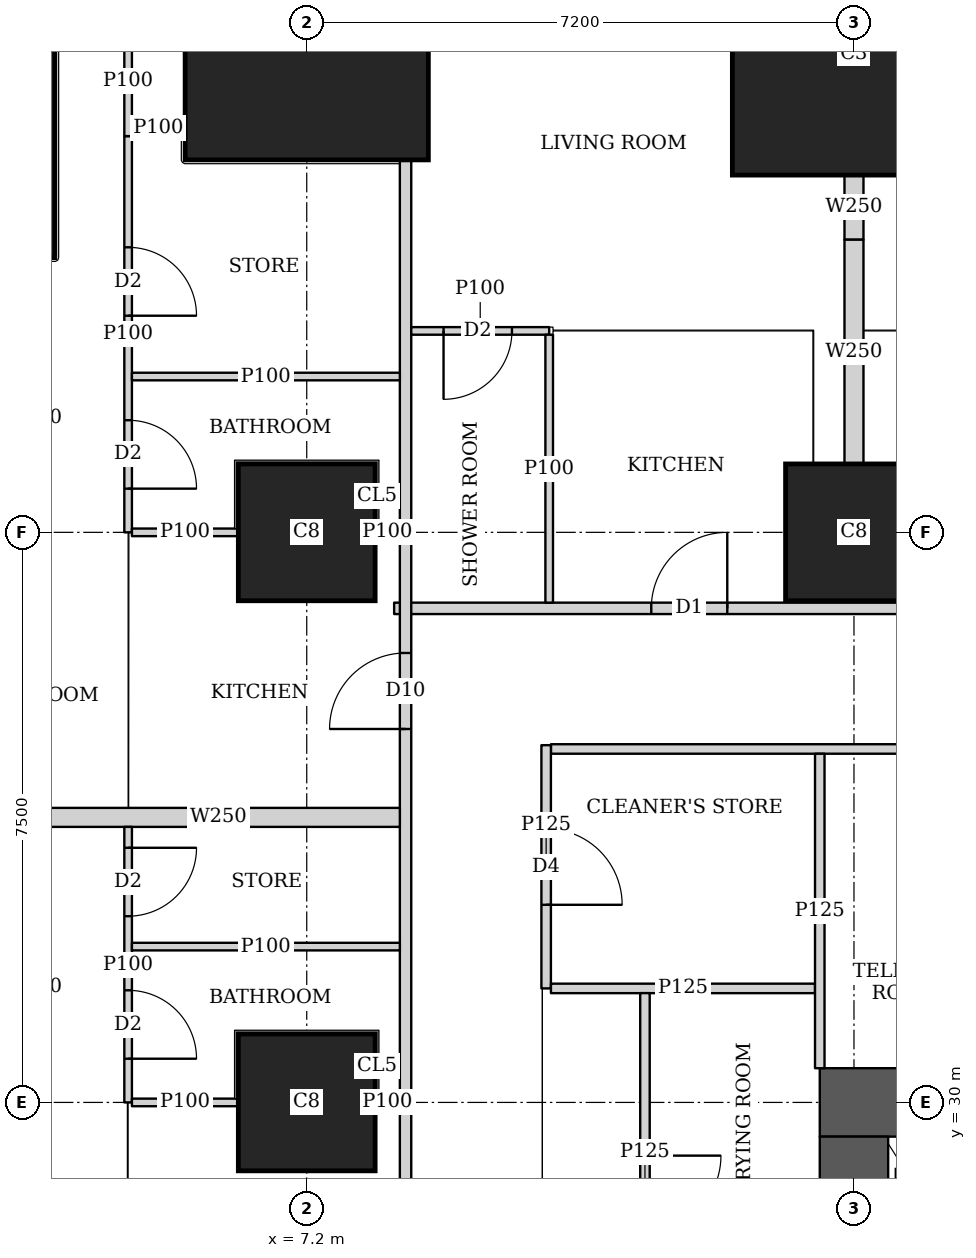
"""IFC4 building model, lengths in metres.
Left out: names, types, materials, properties, quantities, classifications, styles, units other than length and angle.
Written with IfcOpenShell. Run it as: python <this file> out.ifc"""

import sys

from ifc_helpers import new_model, si_unit, direction, frame, frame_2d, origin, origin_2d, place, context, subcontext, project, spatial, rectangle, extrude, element, fill, save


model = new_model("IFC4")
c1 = context("Model", 3, precision=1e-05, world=origin(), true_north=direction((0.0, 1.0)))
c2 = subcontext(c1, "Body", "Model", "MODEL_VIEW")
j1 = project(units=[si_unit("LENGTHUNIT", "METRE"), si_unit("PLANEANGLEUNIT", "RADIAN")], contexts=[c1])
p1 = place(None, origin())
s1 = spatial("IfcSite", under=j1, at=p1, CompositionType="ELEMENT")
p2 = place(p1, origin())
s2 = spatial("IfcBuilding", under=s1, at=p2, CompositionType="ELEMENT")
p3 = place(p2, frame((0.0, 0.0, 20.0)))
s3 = spatial("IfcBuildingStorey", under=s2, at=p3, CompositionType="ELEMENT", Elevation=20.0)
for number, where, z_axis, x_axis in (
    (1, (7.2, 30.0, 0.0), (0.0, 0.0, 1.0), (1.0, 0.0, 0.0)),
    (2, (7.2, 37.5, 0.0), (0.0, 0.0, 1.0), (1.0, 0.0, 0.0)),
    (3, (14.4, 37.5, 0.0), (0.0, 0.0, 1.0), (1.0, 0.0, 0.0)),
):
    element("IfcColumn", number, at=place(p3, frame(where, z_axis=z_axis, x_axis=x_axis)), inside=s3, PredefinedType="COLUMN", context=c2, shape_type="SweptSolid", body=[
        extrude(rectangle(XDim=1.8, YDim=1.8, at=origin_2d()), origin(), (0.0, 0.0, 1.0), 3.75),
    ])
p4 = place(p3, frame((2.186, 42.814, 0.0), z_axis=(0.0, 0.0, 1.0), x_axis=(1.0, 0.0, 0.0)))
e4 = element("IfcColumn", 4, at=p4, inside=s3, PredefinedType="COLUMN", context=c2, shape_type="SweptSolid", body=[
    extrude(rectangle(XDim=3.4, YDim=3.4, at=origin_2d()), origin(), (0.0, 0.0, 1.0), 3.75),
])
p5 = place(p3, frame((7.2, 44.0, -0.3), z_axis=(0.0, 0.0, 1.0), x_axis=(1.0, 0.0, 0.0)))
e5 = element("IfcColumn", 5, at=p5, inside=s3, PredefinedType="COLUMN", context=c2, shape_type="SweptSolid", body=[
    extrude(rectangle(XDim=3.2, YDim=3.2, at=origin_2d()), origin(), (0.0, 0.0, 1.0), 4.05),
])
p6 = place(p3, frame((14.4, 43.8, 0.0), z_axis=(0.0, 0.0, 1.0), x_axis=(1.0, 0.0, 0.0)))
e6 = element("IfcColumn", 6, at=p6, inside=s3, PredefinedType="COLUMN", context=c2, shape_type="SweptSolid", body=[
    extrude(rectangle(XDim=3.2, YDim=3.2, at=origin_2d()), origin(), (0.0, 0.0, 1.0), 3.75),
])
p7 = place(p3, frame((13.95, 30.0, 0.0), z_axis=(0.0, 0.0, 1.0), x_axis=(1.0, 0.0, 0.0)))
e7 = element("IfcWall", 7, at=p7, inside=s3, PredefinedType="SHEAR", context=c2, shape_type="SweptSolid", body=[
    extrude(rectangle(XDim=15.3, YDim=0.9, at=frame_2d((7.65, 0.0))), origin(), (0.0, 0.0, 1.0), 3.75),
])
p8 = place(p7, frame((4.45, 0.0, 0.0)))
e8 = element("IfcOpeningElement", 8, at=p8, cuts=e7, PredefinedType="OPENING", context=c2, shape_type="SweptSolid", body=[
    extrude(rectangle(XDim=1.8, YDim=2.1, at=frame_2d((0.9, 1.05))), frame((0.0, 0.46, 0.0), z_axis=(0.0, -1.0, 0.0), x_axis=(1.0, 0.0, 0.0)), (0.0, 0.0, 1.0), 0.92),
])
p9 = place(p7, frame((10.7, 0.0, 0.0)))
e9 = element("IfcOpeningElement", 9, at=p9, cuts=e7, PredefinedType="OPENING", context=c2, shape_type="SweptSolid", body=[
    extrude(rectangle(XDim=1.1, YDim=2.1, at=frame_2d((0.55, 1.05))), frame((0.0, 0.46, 0.0), z_axis=(0.0, -1.0, 0.0), x_axis=(1.0, 0.0, 0.0)), (0.0, 0.0, 1.0), 0.92),
])
p10 = place(p3, frame((14.4, 15.45, 0.0), z_axis=(0.0, 0.0, 1.0), x_axis=(0.0, 1.0, 0.0)))
e10 = element("IfcWall", 10, at=p10, inside=s3, PredefinedType="SHEAR", context=c2, shape_type="SweptSolid", body=[
    extrude(rectangle(XDim=14.1, YDim=0.9, at=frame_2d((7.05, 0.0))), origin(), (0.0, 0.0, 1.0), 3.75),
])
p11 = place(p3, frame((8.5, 2.626, 0.0), z_axis=(0.0, 0.0, 1.0), x_axis=(0.0, 1.0, 0.0)))
e11 = element("IfcWall", 11, at=p11, inside=s3, PredefinedType="SOLIDWALL", context=c2, shape_type="SweptSolid", body=[
    extrude(rectangle(XDim=39.773, YDim=0.15, at=frame_2d((19.886, 0.0))), origin(), (0.0, 0.0, 1.0), 2.05),
])
p12 = place(p11, frame((9.786, 0.0, 0.0)))
e12 = element("IfcOpeningElement", 12, at=p12, cuts=e11, PredefinedType="OPENING", context=c2, shape_type="SweptSolid", body=[
    extrude(rectangle(XDim=1.0, YDim=2.0, at=frame_2d((0.5, 1.0))), frame((0.0, 0.085, 0.0), z_axis=(0.0, -1.0, 0.0), x_axis=(1.0, 0.0, 0.0)), (0.0, 0.0, 1.0), 0.17),
])
p13 = place(p11, frame((13.961, 0.0, 0.0)))
e13 = element("IfcOpeningElement", 13, at=p13, cuts=e11, PredefinedType="OPENING", context=c2, shape_type="SweptSolid", body=[
    extrude(rectangle(XDim=1.0, YDim=2.0, at=frame_2d((0.5, 1.0))), frame((0.0, 0.085, 0.0), z_axis=(0.0, -1.0, 0.0), x_axis=(1.0, 0.0, 0.0)), (0.0, 0.0, 1.0), 0.17),
])
p14 = place(p11, frame((24.787, 0.0, 0.0)))
e14 = element("IfcOpeningElement", 14, at=p14, cuts=e11, PredefinedType="OPENING", context=c2, shape_type="SweptSolid", body=[
    extrude(rectangle(XDim=1.0, YDim=2.0, at=frame_2d((0.5, 1.0))), frame((0.0, 0.085, 0.0), z_axis=(0.0, -1.0, 0.0), x_axis=(1.0, 0.0, 0.0)), (0.0, 0.0, 1.0), 0.17),
])
p15 = place(p11, frame((32.287, 0.0, 0.0)))
e15 = element("IfcOpeningElement", 15, at=p15, cuts=e11, PredefinedType="OPENING", context=c2, shape_type="SweptSolid", body=[
    extrude(rectangle(XDim=1.0, YDim=2.0, at=frame_2d((0.5, 1.0))), frame((0.0, 0.085, 0.0), z_axis=(0.0, -1.0, 0.0), x_axis=(1.0, 0.0, 0.0)), (0.0, 0.0, 1.0), 0.17),
])
p16 = place(p3, frame((8.35, 36.5, 0.0), z_axis=(0.0, 0.0, 1.0), x_axis=(1.0, 0.0, 0.0)))
e16 = element("IfcWall", 16, at=p16, inside=s3, PredefinedType="SOLIDWALL", context=c2, shape_type="SweptSolid", body=[
    extrude(rectangle(XDim=26.415, YDim=0.15, at=frame_2d((13.208, 0.0))), origin(), (0.0, 0.0, 1.0), 3.5),
])
p17 = place(p16, frame((3.383, 0.0, 0.0)))
e17 = element("IfcOpeningElement", 17, at=p17, cuts=e16, PredefinedType="OPENING", context=c2, shape_type="SweptSolid", body=[
    extrude(rectangle(XDim=1.0, YDim=2.1, at=frame_2d((0.5, 1.05))), frame((0.0, 0.085, 0.0), z_axis=(0.0, -1.0, 0.0), x_axis=(1.0, 0.0, 0.0)), (0.0, 0.0, 1.0), 0.17),
])
p18 = place(p16, frame((7.65, 0.0, 0.0)))
e18 = element("IfcOpeningElement", 18, at=p18, cuts=e16, PredefinedType="OPENING", context=c2, shape_type="SweptSolid", body=[
    extrude(rectangle(XDim=1.0, YDim=2.1, at=frame_2d((0.5, 1.05))), frame((0.0, 0.085, 0.0), z_axis=(0.0, -1.0, 0.0), x_axis=(1.0, 0.0, 0.0)), (0.0, 0.0, 1.0), 0.17),
])
p19 = place(p16, frame((14.857, 0.0, 0.0)))
e19 = element("IfcOpeningElement", 19, at=p19, cuts=e16, PredefinedType="OPENING", context=c2, shape_type="SweptSolid", body=[
    extrude(rectangle(XDim=1.0, YDim=2.1, at=frame_2d((0.5, 1.05))), frame((0.0, 0.085, 0.0), z_axis=(0.0, -1.0, 0.0), x_axis=(1.0, 0.0, 0.0)), (0.0, 0.0, 1.0), 0.17),
])
p20 = place(p3, frame((4.85, 30.0, 0.0), z_axis=(0.0, 0.0, 1.0), x_axis=(0.0, 1.0, 0.0)))
e20 = element("IfcWall", 20, at=p20, inside=s3, PredefinedType="PARTITIONING", context=c2, shape_type="SweptSolid", body=[
    extrude(rectangle(XDim=3.625, YDim=0.1, at=frame_2d((1.812, 0.0))), origin(), (0.0, 0.0, 1.0), 3.5),
])
p21 = place(p20, frame((0.575, 0.0, 0.0)))
e21 = element("IfcOpeningElement", 21, at=p21, cuts=e20, PredefinedType="OPENING", context=c2, shape_type="SweptSolid", body=[
    extrude(rectangle(XDim=0.9, YDim=2.1, at=frame_2d((0.45, 1.05))), frame((0.0, 0.06, 0.0), z_axis=(0.0, -1.0, 0.0), x_axis=(1.0, 0.0, 0.0)), (0.0, 0.0, 1.0), 0.12),
])
p22 = place(p20, frame((2.45, 0.0, 0.0)))
e22 = element("IfcOpeningElement", 22, at=p22, cuts=e20, PredefinedType="OPENING", context=c2, shape_type="SweptSolid", body=[
    extrude(rectangle(XDim=0.9, YDim=2.1, at=frame_2d((0.45, 1.05))), frame((0.0, 0.06, 0.0), z_axis=(0.0, -1.0, 0.0), x_axis=(1.0, 0.0, 0.0)), (0.0, 0.0, 1.0), 0.12),
])
p23 = place(p3, frame((4.9, 30.0, 0.0), z_axis=(0.0, 0.0, 1.0), x_axis=(1.0, 0.0, 0.0)))
e23 = element("IfcWall", 23, at=p23, inside=s3, PredefinedType="PARTITIONING", context=c2, shape_type="SweptSolid", body=[
    extrude(rectangle(XDim=1.399, YDim=0.1, at=frame_2d((0.7, 0.0))), origin(), (0.0, 0.0, 1.0), 3.5),
])
p24 = place(p3, frame((8.101, 30.0, 0.0), z_axis=(0.0, 0.0, 1.0), x_axis=(1.0, 0.0, 0.0)))
e24 = element("IfcWall", 24, at=p24, inside=s3, PredefinedType="PARTITIONING", context=c2, shape_type="SweptSolid", body=[
    extrude(rectangle(XDim=0.324, YDim=0.1, at=frame_2d((0.162, 0.0))), origin(), (0.0, 0.0, 1.0), 3.5),
])
p25 = place(p3, frame((4.9, 32.05, 0.0), z_axis=(0.0, 0.0, 1.0), x_axis=(1.0, 0.0, 0.0)))
e25 = element("IfcWall", 25, at=p25, inside=s3, PredefinedType="PARTITIONING", context=c2, shape_type="SweptSolid", body=[
    extrude(rectangle(XDim=3.525, YDim=0.1, at=frame_2d((1.763, 0.0))), origin(), (0.0, 0.0, 1.0), 3.5),
])
p26 = place(p3, frame((4.85, 37.5, 0.0), z_axis=(0.0, 0.0, 1.0), x_axis=(0.0, 1.0, 0.0)))
e26 = element("IfcWall", 26, at=p26, inside=s3, PredefinedType="PARTITIONING", context=c2, shape_type="SweptSolid", body=[
    extrude(rectangle(XDim=5.213, YDim=0.1, at=frame_2d((2.606, 0.0))), origin(), (0.0, 0.0, 1.0), 3.5),
])
p27 = place(p26, frame((0.575, 0.0, 0.0)))
e27 = element("IfcOpeningElement", 27, at=p27, cuts=e26, PredefinedType="OPENING", context=c2, shape_type="SweptSolid", body=[
    extrude(rectangle(XDim=0.9, YDim=2.1, at=frame_2d((0.45, 1.05))), frame((0.0, 0.06, 0.0), z_axis=(0.0, -1.0, 0.0), x_axis=(1.0, 0.0, 0.0)), (0.0, 0.0, 1.0), 0.12),
])
p28 = place(p26, frame((2.85, 0.0, 0.0)))
e28 = element("IfcOpeningElement", 28, at=p28, cuts=e26, PredefinedType="OPENING", context=c2, shape_type="SweptSolid", body=[
    extrude(rectangle(XDim=0.9, YDim=2.1, at=frame_2d((0.45, 1.05))), frame((0.0, 0.06, 0.0), z_axis=(0.0, -1.0, 0.0), x_axis=(1.0, 0.0, 0.0)), (0.0, 0.0, 1.0), 0.12),
])
p29 = place(p3, frame((4.85, 42.713, 0.0), z_axis=(0.0, 0.0, 1.0), x_axis=(0.0, 1.0, 0.0)))
e29 = element("IfcWall", 29, at=p29, inside=s3, PredefinedType="PARTITIONING", context=c2, shape_type="SweptSolid", body=[
    extrude(rectangle(XDim=1.462, YDim=0.1, at=frame_2d((0.731, 0.0))), origin(), (0.0, 0.0, 1.0), 2.1),
])
p30 = place(p3, frame((4.9, 37.5, 0.0), z_axis=(0.0, 0.0, 1.0), x_axis=(1.0, 0.0, 0.0)))
e30 = element("IfcWall", 30, at=p30, inside=s3, PredefinedType="PARTITIONING", context=c2, shape_type="SweptSolid", body=[
    extrude(rectangle(XDim=1.399, YDim=0.1, at=frame_2d((0.7, 0.0))), origin(), (0.0, 0.0, 1.0), 3.5),
])
p31 = place(p3, frame((8.101, 37.5, 0.0), z_axis=(0.0, 0.0, 1.0), x_axis=(1.0, 0.0, 0.0)))
e31 = element("IfcWall", 31, at=p31, inside=s3, PredefinedType="PARTITIONING", context=c2, shape_type="SweptSolid", body=[
    extrude(rectangle(XDim=0.324, YDim=0.1, at=frame_2d((0.162, 0.0))), origin(), (0.0, 0.0, 1.0), 3.5),
])
p32 = place(p3, frame((4.9, 42.814, 0.0), z_axis=(0.0, 0.0, 1.0), x_axis=(1.0, 0.0, 0.0)))
e32 = element("IfcWall", 32, at=p32, inside=s3, PredefinedType="PARTITIONING", context=c2, shape_type="SweptSolid", body=[
    extrude(rectangle(XDim=0.699, YDim=0.1, at=frame_2d((0.35, 0.0))), origin(), (0.0, 0.0, 1.0), 2.1),
])
p33 = place(p3, frame((4.9, 39.55, 0.0), z_axis=(0.0, 0.0, 1.0), x_axis=(1.0, 0.0, 0.0)))
e33 = element("IfcWall", 33, at=p33, inside=s3, PredefinedType="PARTITIONING", context=c2, shape_type="SweptSolid", body=[
    extrude(rectangle(XDim=3.525, YDim=0.1, at=frame_2d((1.763, 0.0))), origin(), (0.0, 0.0, 1.0), 3.5),
])
p34 = place(p3, frame((3.65, 33.75, 0.0), z_axis=(0.0, 0.0, 1.0), x_axis=(1.0, 0.0, 0.0)))
e34 = element("IfcWall", 34, at=p34, inside=s3, PredefinedType="SOLIDWALL", context=c2, shape_type="SweptSolid", body=[
    extrude(rectangle(XDim=4.775, YDim=0.25, at=frame_2d((2.388, 0.0))), origin(), (0.0, 0.0, 1.0), 3.5),
])
p35 = place(p3, frame((8.575, 40.15, 0.0), z_axis=(0.0, 0.0, 1.0), x_axis=(1.0, 0.0, 0.0)))
e35 = element("IfcWall", 35, at=p35, inside=s3, PredefinedType="PARTITIONING", context=c2, shape_type="SweptSolid", body=[
    extrude(rectangle(XDim=1.815, YDim=0.1, at=frame_2d((0.907, 0.0))), origin(), (0.0, 0.0, 1.0), 3.5),
])
p36 = place(p35, frame((0.425, 0.0, 0.0)))
e36 = element("IfcOpeningElement", 36, at=p36, cuts=e35, PredefinedType="OPENING", context=c2, shape_type="SweptSolid", body=[
    extrude(rectangle(XDim=0.9, YDim=2.1, at=frame_2d((0.45, 1.05))), frame((0.0, 0.06, 0.0), z_axis=(0.0, -1.0, 0.0), x_axis=(1.0, 0.0, 0.0)), (0.0, 0.0, 1.0), 0.12),
])
p37 = place(p3, frame((10.39, 36.575, 0.0), z_axis=(0.0, 0.0, 1.0), x_axis=(0.0, 1.0, 0.0)))
e37 = element("IfcWall", 37, at=p37, inside=s3, PredefinedType="PARTITIONING", context=c2, shape_type="SweptSolid", body=[
    extrude(rectangle(XDim=3.525, YDim=0.1, at=frame_2d((1.763, 0.0))), origin(), (0.0, 0.0, 1.0), 3.5),
])
p38 = place(p3, frame((14.4, 41.35, 0.0), z_axis=(0.0, 0.0, 1.0), x_axis=(0.0, 1.0, 0.0)))
e38 = element("IfcWall", 38, at=p38, inside=s3, PredefinedType="SOLIDWALL", context=c2, shape_type="SweptSolid", body=[
    extrude(rectangle(XDim=0.849, YDim=0.25, at=frame_2d((0.424, 0.0))), origin(), (0.0, 0.0, 1.0), 2.05),
])
p39 = place(p3, frame((14.4, 38.401, 0.0), z_axis=(0.0, 0.0, 1.0), x_axis=(0.0, 1.0, 0.0)))
e39 = element("IfcWall", 39, at=p39, inside=s3, PredefinedType="SOLIDWALL", context=c2, shape_type="SweptSolid", body=[
    extrude(rectangle(XDim=2.949, YDim=0.25, at=frame_2d((1.475, 0.0))), origin(), (0.0, 0.0, 1.0), 3.5),
])
p40 = place(p3, frame((10.35, 31.5, 0.0), z_axis=(0.0, 0.0, 1.0), x_axis=(0.0, 1.0, 0.0)))
e40 = element("IfcWall", 40, at=p40, inside=s3, PredefinedType="PARTITIONING", context=c2, shape_type="SweptSolid", body=[
    extrude(rectangle(XDim=3.2, YDim=0.125, at=frame_2d((1.6, 0.0))), origin(), (0.0, 0.0, 1.0), 3.5),
])
p41 = place(p40, frame((1.1, 0.0, 0.0)))
e41 = element("IfcOpeningElement", 41, at=p41, cuts=e40, PredefinedType="OPENING", context=c2, shape_type="SweptSolid", body=[
    extrude(rectangle(XDim=1.0, YDim=2.1, at=frame_2d((0.5, 1.05))), frame((0.0, 0.073, 0.0), z_axis=(0.0, -1.0, 0.0), x_axis=(1.0, 0.0, 0.0)), (0.0, 0.0, 1.0), 0.145),
])
p42 = place(p3, frame((11.65, 26.163, 0.0), z_axis=(0.0, 0.0, 1.0), x_axis=(0.0, 1.0, 0.0)))
e42 = element("IfcWall", 42, at=p42, inside=s3, PredefinedType="PARTITIONING", context=c2, shape_type="SweptSolid", body=[
    extrude(rectangle(XDim=5.275, YDim=0.125, at=frame_2d((2.637, 0.0))), origin(), (0.0, 0.0, 1.0), 3.5),
])
p43 = place(p42, frame((2.137, 0.0, 0.0)))
e43 = element("IfcOpeningElement", 43, at=p43, cuts=e42, PredefinedType="OPENING", context=c2, shape_type="SweptSolid", body=[
    extrude(rectangle(XDim=1.0, YDim=2.1, at=frame_2d((0.5, 1.05))), frame((0.0, 0.073, 0.0), z_axis=(0.0, -1.0, 0.0), x_axis=(1.0, 0.0, 0.0)), (0.0, 0.0, 1.0), 0.145),
])
p44 = place(p3, frame((10.413, 31.5, 0.0), z_axis=(0.0, 0.0, 1.0), x_axis=(1.0, 0.0, 0.0)))
e44 = element("IfcWall", 44, at=p44, inside=s3, PredefinedType="PARTITIONING", context=c2, shape_type="SweptSolid", body=[
    extrude(rectangle(XDim=3.475, YDim=0.125, at=frame_2d((1.737, 0.0))), origin(), (0.0, 0.0, 1.0), 3.5),
])
p45 = place(p3, frame((13.95, 30.45, 0.0), z_axis=(0.0, 0.0, 1.0), x_axis=(0.0, 1.0, 0.0)))
e45 = element("IfcWall", 45, at=p45, inside=s3, PredefinedType="PARTITIONING", context=c2, shape_type="SweptSolid", body=[
    extrude(rectangle(XDim=4.137, YDim=0.125, at=frame_2d((2.068, 0.0))), origin(), (0.0, 0.0, 1.0), 3.5),
])
p46 = place(p3, frame((10.413, 34.65, 0.0), z_axis=(0.0, 0.0, 1.0), x_axis=(1.0, 0.0, 0.0)))
e46 = element("IfcWall", 46, at=p46, inside=s3, PredefinedType="PARTITIONING", context=c2, shape_type="SweptSolid", body=[
    extrude(rectangle(XDim=10.837, YDim=0.125, at=frame_2d((5.418, 0.0))), origin(), (0.0, 0.0, 1.0), 3.5),
])
p47 = place(p46, frame((7.487, 0.0, 0.0)))
e47 = element("IfcOpeningElement", 47, at=p47, cuts=e46, PredefinedType="OPENING", context=c2, shape_type="SweptSolid", body=[
    extrude(rectangle(XDim=1.8, YDim=2.1, at=frame_2d((0.9, 1.05))), frame((0.0, 0.073, 0.0), z_axis=(0.0, -1.0, 0.0), x_axis=(1.0, 0.0, 0.0)), (0.0, 0.0, 1.0), 0.145),
])
p48 = place(p21, origin())
e48 = element("IfcDoor", 48, at=p48, inside=s3, OperationType="SINGLE_SWING_RIGHT", PredefinedType="DOOR", context=c2, shape_type="SweptSolid", body=[
    extrude(rectangle(XDim=0.9, YDim=2.1, at=frame_2d((0.45, 1.05))), frame((0.0, 0.025, 0.0), z_axis=(0.0, -1.0, 0.0), x_axis=(1.0, 0.0, 0.0)), (0.0, 0.0, 1.0), 0.05),
])
fill(e21, e48)
p49 = place(p22, origin())
e49 = element("IfcDoor", 49, at=p49, inside=s3, OperationType="SINGLE_SWING_LEFT", PredefinedType="DOOR", context=c2, shape_type="SweptSolid", body=[
    extrude(rectangle(XDim=0.9, YDim=2.1, at=frame_2d((0.45, 1.05))), frame((0.0, 0.025, 0.0), z_axis=(0.0, -1.0, 0.0), x_axis=(1.0, 0.0, 0.0)), (0.0, 0.0, 1.0), 0.05),
])
fill(e22, e49)
p50 = place(p27, origin())
e50 = element("IfcDoor", 50, at=p50, inside=s3, OperationType="SINGLE_SWING_RIGHT", PredefinedType="DOOR", context=c2, shape_type="SweptSolid", body=[
    extrude(rectangle(XDim=0.9, YDim=2.1, at=frame_2d((0.45, 1.05))), frame((0.0, 0.025, 0.0), z_axis=(0.0, -1.0, 0.0), x_axis=(1.0, 0.0, 0.0)), (0.0, 0.0, 1.0), 0.05),
])
fill(e27, e50)
p51 = place(p28, origin())
e51 = element("IfcDoor", 51, at=p51, inside=s3, OperationType="SINGLE_SWING_RIGHT", PredefinedType="DOOR", context=c2, shape_type="SweptSolid", body=[
    extrude(rectangle(XDim=0.9, YDim=2.1, at=frame_2d((0.45, 1.05))), frame((0.0, 0.025, 0.0), z_axis=(0.0, -1.0, 0.0), x_axis=(1.0, 0.0, 0.0)), (0.0, 0.0, 1.0), 0.05),
])
fill(e28, e51)
p52 = place(p15, origin())
e52 = element("IfcDoor", 52, at=p52, inside=s3, OperationType="SINGLE_SWING_LEFT", PredefinedType="DOOR", context=c2, shape_type="SweptSolid", body=[
    extrude(rectangle(XDim=1.0, YDim=2.0, at=frame_2d((0.5, 1.0))), frame((0.0, 0.025, 0.0), z_axis=(0.0, -1.0, 0.0), x_axis=(1.0, 0.0, 0.0)), (0.0, 0.0, 1.0), 0.05),
])
fill(e15, e52)
p53 = place(p36, origin())
e53 = element("IfcDoor", 53, at=p53, inside=s3, OperationType="SINGLE_SWING_RIGHT", PredefinedType="DOOR", context=c2, shape_type="SweptSolid", body=[
    extrude(rectangle(XDim=0.9, YDim=2.1, at=frame_2d((0.45, 1.05))), frame((0.0, 0.025, 0.0), z_axis=(0.0, -1.0, 0.0), x_axis=(1.0, 0.0, 0.0)), (0.0, 0.0, 1.0), 0.05),
])
fill(e36, e53)
p54 = place(p17, origin())
e54 = element("IfcDoor", 54, at=p54, inside=s3, OperationType="SINGLE_SWING_RIGHT", PredefinedType="DOOR", context=c2, shape_type="SweptSolid", body=[
    extrude(rectangle(XDim=1.0, YDim=2.1, at=frame_2d((0.5, 1.05))), frame((0.0, 0.025, 0.0), z_axis=(0.0, -1.0, 0.0), x_axis=(1.0, 0.0, 0.0)), (0.0, 0.0, 1.0), 0.05),
])
fill(e17, e54)
p55 = place(p43, origin())
e55 = element("IfcDoor", 55, at=p55, inside=s3, OperationType="SINGLE_SWING_LEFT", PredefinedType="DOOR", context=c2, shape_type="SweptSolid", body=[
    extrude(rectangle(XDim=1.0, YDim=2.1, at=frame_2d((0.5, 1.05))), frame((0.0, 0.025, 0.0), z_axis=(0.0, -1.0, 0.0), x_axis=(1.0, 0.0, 0.0)), (0.0, 0.0, 1.0), 0.05),
])
fill(e43, e55)
p56 = place(p41, origin())
e56 = element("IfcDoor", 56, at=p56, inside=s3, OperationType="SINGLE_SWING_RIGHT", PredefinedType="DOOR", context=c2, shape_type="SweptSolid", body=[
    extrude(rectangle(XDim=1.0, YDim=2.1, at=frame_2d((0.5, 1.05))), frame((0.0, 0.025, 0.0), z_axis=(0.0, -1.0, 0.0), x_axis=(1.0, 0.0, 0.0)), (0.0, 0.0, 1.0), 0.05),
])
fill(e41, e56)
save(model, sys.argv[1])
